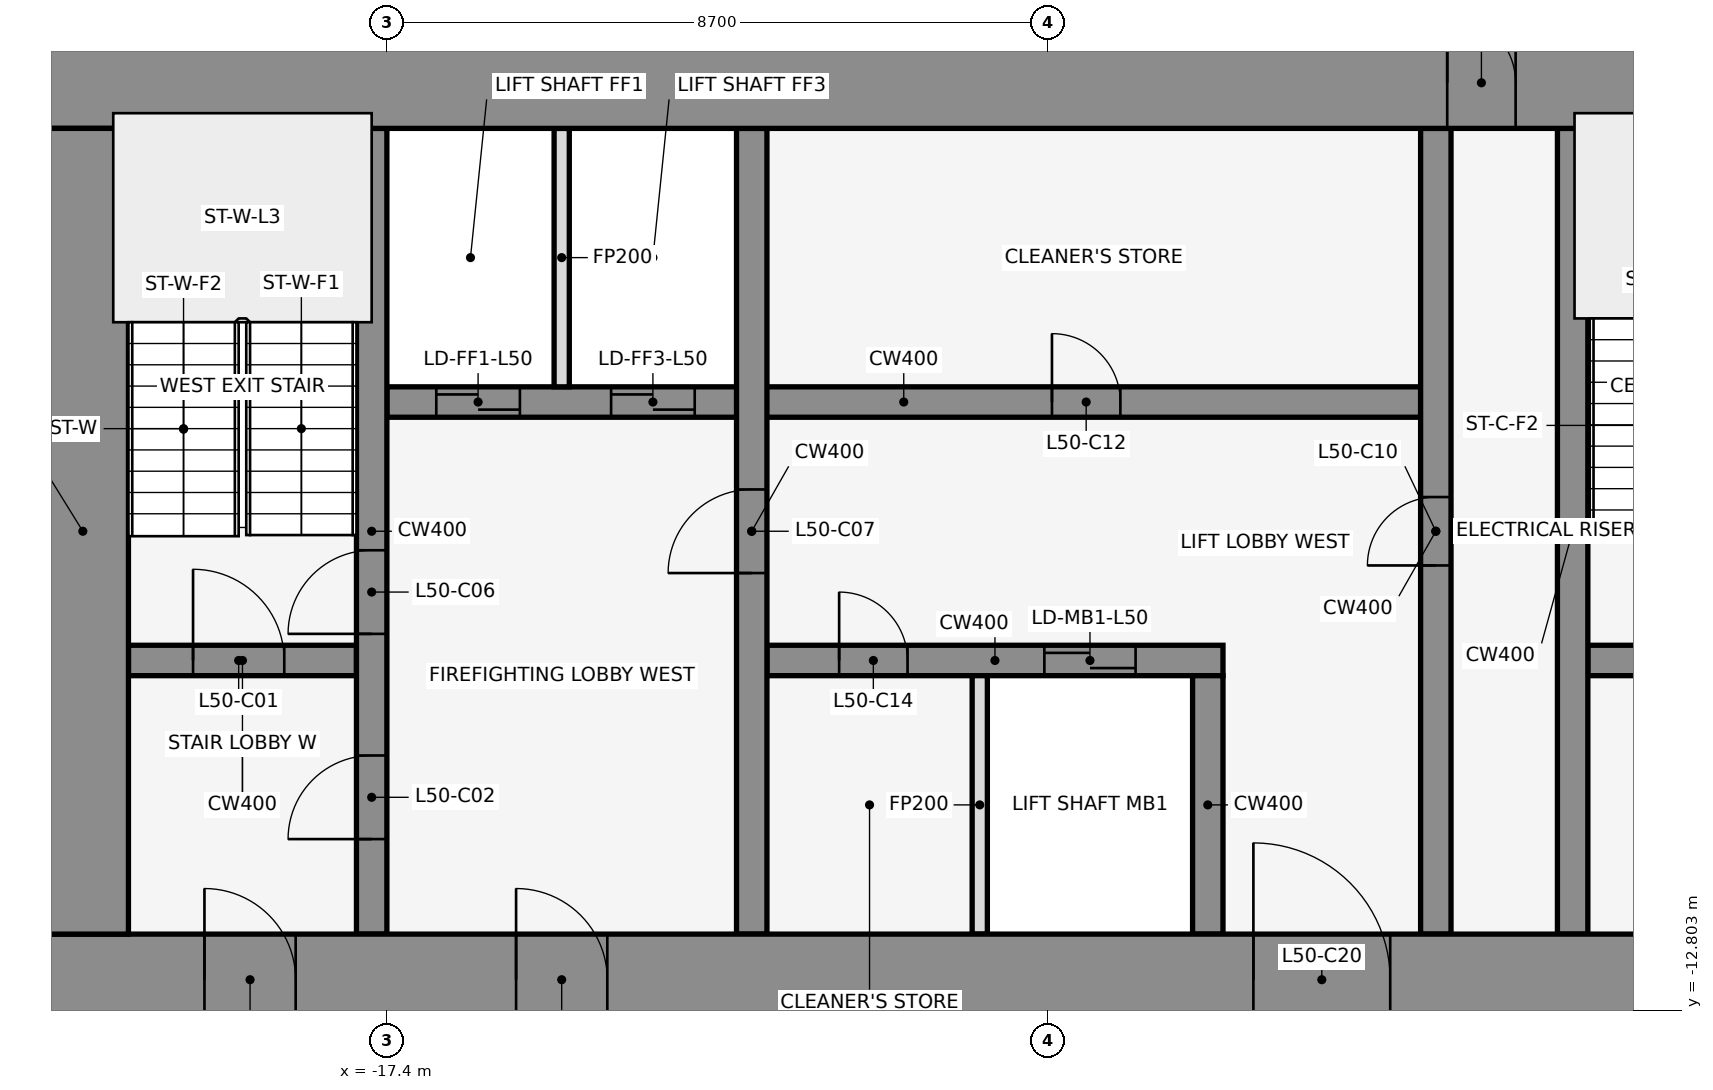
"""IFC4 building model, lengths in metres.
Left out: names, types, materials, properties, quantities, classifications, styles, units other than length and angle.
Written with IfcOpenShell. Run it as: python <this file> out.ifc"""

import sys

from ifc_helpers import new_model, si_unit, direction, frame, frame_2d, origin, place, context, subcontext, project, spatial, rectangle, extrude, element, fill, save


model = new_model("IFC4")
c1 = context("Model", 3, precision=1e-05, world=origin(), true_north=direction((0.0, 1.0)))
c2 = subcontext(c1, "Body", "Model", "MODEL_VIEW")
j1 = project(units=[si_unit("LENGTHUNIT", "METRE"), si_unit("PLANEANGLEUNIT", "RADIAN")], contexts=[c1])
p1 = place(None, origin())
s1 = spatial("IfcSite", under=j1, at=p1, CompositionType="ELEMENT")
p2 = place(p1, origin())
s2 = spatial("IfcBuilding", under=s1, at=p2, CompositionType="ELEMENT")
p3 = place(p2, frame((0.0, 0.0, 223.7)))
s3 = spatial("IfcBuildingStorey", under=s2, at=p3, CompositionType="ELEMENT", Elevation=223.7)
for number, where, z_axis, x_axis in (
    (1, (-0.068, -0.105, 0.0), (0.0, 0.0, 1.0), (-0.84, 0.543, 0.0)),
    (2, (-14.599, 1.08, 0.0), (0.0, 0.0, 1.0), (-0.84, -0.543, 0.0)),
):
    element("IfcWall", number, at=place(p3, frame(where, z_axis=z_axis, x_axis=x_axis)), inside=s3, PredefinedType="STANDARD", context=c2, shape_type="SweptSolid", body=[
        extrude(rectangle(XDim=2.183, YDim=0.25, at=frame_2d((1.091, 0.0))), origin(), (0.0, 0.0, 1.0), 3.95),
    ])
p4 = place(p3, frame((-20.8, -8.2, 0.0), z_axis=(0.0, 0.0, 1.0), x_axis=(1.0, 0.0, 0.0)))
e3 = element("IfcWall", 3, at=p4, inside=s3, PredefinedType="SHEAR", context=c2, shape_type="SweptSolid", body=[
    extrude(rectangle(XDim=3.0, YDim=0.4, at=frame_2d((1.5, 0.0))), origin(), (0.0, 0.0, 1.0), 4.1),
])
p5 = place(p4, frame((0.85, 0.0, 0.0)))
e4 = element("IfcOpeningElement", 4, at=p5, cuts=e3, PredefinedType="OPENING", context=c2, shape_type="SweptSolid", body=[
    extrude(rectangle(XDim=1.2, YDim=2.1, at=frame_2d((0.6, 1.05))), frame((0.0, 0.212, 0.0), z_axis=(0.0, -1.0, 0.0), x_axis=(1.0, 0.0, 0.0)), (0.0, 0.0, 1.0), 0.424),
])
p6 = place(p3, frame((-12.4, -8.2, 0.0), z_axis=(0.0, 0.0, 1.0), x_axis=(1.0, 0.0, 0.0)))
e5 = element("IfcWall", 5, at=p6, inside=s3, PredefinedType="SHEAR", context=c2, shape_type="SweptSolid", body=[
    extrude(rectangle(XDim=6.0, YDim=0.4, at=frame_2d((3.0, 0.0))), origin(), (0.0, 0.0, 1.0), 4.1),
])
p7 = place(p6, frame((3.65, 0.0, 0.0)))
e6 = element("IfcOpeningElement", 6, at=p7, cuts=e5, PredefinedType="OPENING", context=c2, shape_type="SweptSolid", body=[
    extrude(rectangle(XDim=1.2, YDim=2.1, at=frame_2d((0.6, 1.05))), frame((0.0, 0.212, 0.0), z_axis=(0.0, -1.0, 0.0), x_axis=(1.0, 0.0, 0.0)), (0.0, 0.0, 1.0), 0.424),
])
p8 = place(p6, frame((0.95, 0.0, 0.0)))
e7 = element("IfcOpeningElement", 7, at=p8, cuts=e5, PredefinedType="OPENING", context=c2, shape_type="SweptSolid", body=[
    extrude(rectangle(XDim=0.9, YDim=2.1, at=frame_2d((0.45, 1.05))), frame((0.0, 0.212, 0.0), z_axis=(0.0, -1.0, 0.0), x_axis=(1.0, 0.0, 0.0)), (0.0, 0.0, 1.0), 0.424),
])
p9 = place(p3, frame((-1.6, -8.2, 0.0), z_axis=(0.0, 0.0, 1.0), x_axis=(1.0, 0.0, 0.0)))
e8 = element("IfcWall", 8, at=p9, inside=s3, PredefinedType="SHEAR", context=c2, shape_type="SweptSolid", body=[
    extrude(rectangle(XDim=3.2, YDim=0.4, at=frame_2d((1.6, 0.0))), origin(), (0.0, 0.0, 1.0), 4.1),
])
p10 = place(p9, frame((1.05, 0.0, 0.0)))
e9 = element("IfcOpeningElement", 9, at=p10, cuts=e8, PredefinedType="OPENING", context=c2, shape_type="SweptSolid", body=[
    extrude(rectangle(XDim=1.2, YDim=2.1, at=frame_2d((0.6, 1.05))), frame((0.0, 0.212, 0.0), z_axis=(0.0, -1.0, 0.0), x_axis=(1.0, 0.0, 0.0)), (0.0, 0.0, 1.0), 0.424),
])
p11 = place(p3, frame((-17.4, -4.8, 0.0), z_axis=(0.0, 0.0, 1.0), x_axis=(1.0, 0.0, 0.0)))
e10 = element("IfcWall", 10, at=p11, inside=s3, PredefinedType="SHEAR", context=c2, shape_type="SweptSolid", body=[
    extrude(rectangle(XDim=13.6, YDim=0.4, at=frame_2d((6.8, 0.0))), origin(), (0.0, 0.0, 1.0), 4.1),
])
p12 = place(p11, frame((0.65, 0.0, 0.0)))
e11 = element("IfcOpeningElement", 11, at=p12, cuts=e10, PredefinedType="OPENING", context=c2, shape_type="SweptSolid", body=[
    extrude(rectangle(XDim=1.1, YDim=2.1, at=frame_2d((0.55, 1.05))), frame((0.0, 0.212, 0.0), z_axis=(0.0, -1.0, 0.0), x_axis=(1.0, 0.0, 0.0)), (0.0, 0.0, 1.0), 0.424),
])
p13 = place(p11, frame((2.95, 0.0, 0.0)))
e12 = element("IfcOpeningElement", 12, at=p13, cuts=e10, PredefinedType="OPENING", context=c2, shape_type="SweptSolid", body=[
    extrude(rectangle(XDim=1.1, YDim=2.1, at=frame_2d((0.55, 1.05))), frame((0.0, 0.212, 0.0), z_axis=(0.0, -1.0, 0.0), x_axis=(1.0, 0.0, 0.0)), (0.0, 0.0, 1.0), 0.424),
])
p14 = place(p11, frame((8.75, 0.0, 0.0)))
e13 = element("IfcOpeningElement", 13, at=p14, cuts=e10, PredefinedType="OPENING", context=c2, shape_type="SweptSolid", body=[
    extrude(rectangle(XDim=0.9, YDim=2.1, at=frame_2d((0.45, 1.05))), frame((0.0, 0.212, 0.0), z_axis=(0.0, -1.0, 0.0), x_axis=(1.0, 0.0, 0.0)), (0.0, 0.0, 1.0), 0.424),
])
p15 = place(p3, frame((-17.6, -11.8, 0.0), z_axis=(0.0, 0.0, 1.0), x_axis=(0.0, 1.0, 0.0)))
e14 = element("IfcWall", 14, at=p15, inside=s3, PredefinedType="SHEAR", context=c2, shape_type="SweptSolid", body=[
    extrude(rectangle(XDim=10.6, YDim=0.4, at=frame_2d((5.3, 0.0))), origin(), (0.0, 0.0, 1.0), 4.1),
])
p16 = place(p15, frame((1.25, 0.0, 0.0)))
e15 = element("IfcOpeningElement", 15, at=p16, cuts=e14, PredefinedType="OPENING", context=c2, shape_type="SweptSolid", body=[
    extrude(rectangle(XDim=1.1, YDim=2.1, at=frame_2d((0.55, 1.05))), frame((0.0, 0.212, 0.0), z_axis=(0.0, -1.0, 0.0), x_axis=(1.0, 0.0, 0.0)), (0.0, 0.0, 1.0), 0.424),
])
p17 = place(p15, frame((3.95, 0.0, 0.0)))
e16 = element("IfcOpeningElement", 16, at=p17, cuts=e14, PredefinedType="OPENING", context=c2, shape_type="SweptSolid", body=[
    extrude(rectangle(XDim=1.1, YDim=2.1, at=frame_2d((0.55, 1.05))), frame((0.0, 0.212, 0.0), z_axis=(0.0, -1.0, 0.0), x_axis=(1.0, 0.0, 0.0)), (0.0, 0.0, 1.0), 0.424),
])
p18 = place(p3, frame((-15.1, -4.6, 0.0), z_axis=(0.0, 0.0, 1.0), x_axis=(0.0, 1.0, 0.0)))
e17 = element("IfcWall", 17, at=p18, inside=s3, PredefinedType="PARTITIONING", context=c2, shape_type="SweptSolid", body=[
    extrude(rectangle(XDim=3.4, YDim=0.2, at=frame_2d((1.7, 0.0))), origin(), (0.0, 0.0, 1.0), 2.84),
])
p19 = place(p3, frame((-12.6, -11.8, 0.0), z_axis=(0.0, 0.0, 1.0), x_axis=(0.0, 1.0, 0.0)))
e18 = element("IfcWall", 18, at=p19, inside=s3, PredefinedType="SHEAR", context=c2, shape_type="SweptSolid", body=[
    extrude(rectangle(XDim=10.6, YDim=0.4, at=frame_2d((5.3, 0.0))), origin(), (0.0, 0.0, 1.0), 4.1),
])
p20 = place(p19, frame((4.75, 0.0, 0.0)))
e19 = element("IfcOpeningElement", 19, at=p20, cuts=e18, PredefinedType="OPENING", context=c2, shape_type="SweptSolid", body=[
    extrude(rectangle(XDim=1.1, YDim=2.1, at=frame_2d((0.55, 1.05))), frame((0.0, 0.212, 0.0), z_axis=(0.0, -1.0, 0.0), x_axis=(1.0, 0.0, 0.0)), (0.0, 0.0, 1.0), 0.424),
])
p21 = place(p3, frame((-9.6, -11.8, 0.0), z_axis=(0.0, 0.0, 1.0), x_axis=(0.0, 1.0, 0.0)))
e20 = element("IfcWall", 20, at=p21, inside=s3, PredefinedType="PARTITIONING", context=c2, shape_type="SweptSolid", body=[
    extrude(rectangle(XDim=3.4, YDim=0.2, at=frame_2d((1.7, 0.0))), origin(), (0.0, 0.0, 1.0), 2.84),
])
p22 = place(p3, frame((-6.6, -11.8, 0.0), z_axis=(0.0, 0.0, 1.0), x_axis=(0.0, 1.0, 0.0)))
e21 = element("IfcWall", 21, at=p22, inside=s3, PredefinedType="SHEAR", context=c2, shape_type="SweptSolid", body=[
    extrude(rectangle(XDim=3.4, YDim=0.4, at=frame_2d((1.7, 0.0))), origin(), (0.0, 0.0, 1.0), 4.1),
])
p23 = place(p3, frame((-3.6, -11.8, 0.0), z_axis=(0.0, 0.0, 1.0), x_axis=(0.0, 1.0, 0.0)))
e22 = element("IfcWall", 22, at=p23, inside=s3, PredefinedType="SHEAR", context=c2, shape_type="SweptSolid", body=[
    extrude(rectangle(XDim=10.6, YDim=0.4, at=frame_2d((5.3, 0.0))), origin(), (0.0, 0.0, 1.0), 4.1),
])
p24 = place(p23, frame((4.85, 0.0, 0.0)))
e23 = element("IfcOpeningElement", 23, at=p24, cuts=e22, PredefinedType="OPENING", context=c2, shape_type="SweptSolid", body=[
    extrude(rectangle(XDim=0.9, YDim=2.1, at=frame_2d((0.45, 1.05))), frame((0.0, 0.212, 0.0), z_axis=(0.0, -1.0, 0.0), x_axis=(1.0, 0.0, 0.0)), (0.0, 0.0, 1.0), 0.424),
])
p25 = place(p3, frame((-1.8, -11.8, 0.0), z_axis=(0.0, 0.0, 1.0), x_axis=(0.0, 1.0, 0.0)))
e24 = element("IfcWall", 24, at=p25, inside=s3, PredefinedType="SHEAR", context=c2, shape_type="SweptSolid", body=[
    extrude(rectangle(XDim=10.6, YDim=0.4, at=frame_2d((5.3, 0.0))), origin(), (0.0, 0.0, 1.0), 4.1),
])
p26 = place(p3, frame((-22.0, -0.6, 0.0), z_axis=(0.0, 0.0, 1.0), x_axis=(1.0, 0.0, 0.0)))
e25 = element("IfcWall", 25, at=p26, inside=s3, PredefinedType="SHEAR", context=c2, shape_type="SweptSolid", body=[
    extrude(rectangle(XDim=44.0, YDim=1.2, at=frame_2d((22.0, 0.0))), origin(), (0.0, 0.0, 1.0), 4.1),
])
p27 = place(p26, frame((18.55, 0.0, 0.0)))
e26 = element("IfcOpeningElement", 26, at=p27, cuts=e25, PredefinedType="OPENING", context=c2, shape_type="SweptSolid", body=[
    extrude(rectangle(XDim=0.9, YDim=2.1, at=frame_2d((0.45, 1.05))), frame((0.0, 0.612, 0.0), z_axis=(0.0, -1.0, 0.0), x_axis=(1.0, 0.0, 0.0)), (0.0, 0.0, 1.0), 1.224),
])
p28 = place(p26, frame((24.55, 0.0, 0.0)))
e27 = element("IfcOpeningElement", 27, at=p28, cuts=e25, PredefinedType="OPENING", context=c2, shape_type="SweptSolid", body=[
    extrude(rectangle(XDim=0.9, YDim=2.1, at=frame_2d((0.45, 1.05))), frame((0.0, 0.612, 0.0), z_axis=(0.0, -1.0, 0.0), x_axis=(1.0, 0.0, 0.0)), (0.0, 0.0, 1.0), 1.224),
])
p29 = place(p3, frame((-22.0, -12.4, 0.0), z_axis=(0.0, 0.0, 1.0), x_axis=(1.0, 0.0, 0.0)))
e28 = element("IfcWall", 28, at=p29, inside=s3, PredefinedType="SHEAR", context=c2, shape_type="SweptSolid", body=[
    extrude(rectangle(XDim=44.0, YDim=1.2, at=frame_2d((22.0, 0.0))), origin(), (0.0, 0.0, 1.0), 4.1),
])
p30 = place(p29, frame((2.2, 0.0, 0.0)))
e29 = element("IfcOpeningElement", 29, at=p30, cuts=e28, PredefinedType="OPENING", context=c2, shape_type="SweptSolid", body=[
    extrude(rectangle(XDim=1.2, YDim=2.1, at=frame_2d((0.6, 1.05))), frame((0.0, 0.612, 0.0), z_axis=(0.0, -1.0, 0.0), x_axis=(1.0, 0.0, 0.0)), (0.0, 0.0, 1.0), 1.224),
])
p31 = place(p29, frame((21.4, 0.0, 0.0)))
e30 = element("IfcOpeningElement", 30, at=p31, cuts=e28, PredefinedType="OPENING", context=c2, shape_type="SweptSolid", body=[
    extrude(rectangle(XDim=1.2, YDim=2.1, at=frame_2d((0.6, 1.05))), frame((0.0, 0.612, 0.0), z_axis=(0.0, -1.0, 0.0), x_axis=(1.0, 0.0, 0.0)), (0.0, 0.0, 1.0), 1.224),
])
p32 = place(p29, frame((40.6, 0.0, 0.0)))
e31 = element("IfcOpeningElement", 31, at=p32, cuts=e28, PredefinedType="OPENING", context=c2, shape_type="SweptSolid", body=[
    extrude(rectangle(XDim=1.2, YDim=2.1, at=frame_2d((0.6, 1.05))), frame((0.0, 0.612, 0.0), z_axis=(0.0, -1.0, 0.0), x_axis=(1.0, 0.0, 0.0)), (0.0, 0.0, 1.0), 1.224),
])
p33 = place(p29, frame((16.0, 0.0, 0.0)))
e32 = element("IfcOpeningElement", 32, at=p33, cuts=e28, PredefinedType="OPENING", context=c2, shape_type="SweptSolid", body=[
    extrude(rectangle(XDim=1.8, YDim=2.1, at=frame_2d((0.9, 1.05))), frame((0.0, 0.612, 0.0), z_axis=(0.0, -1.0, 0.0), x_axis=(1.0, 0.0, 0.0)), (0.0, 0.0, 1.0), 1.224),
])
p34 = place(p29, frame((6.3, 0.0, 0.0)))
e33 = element("IfcOpeningElement", 33, at=p34, cuts=e28, PredefinedType="OPENING", context=c2, shape_type="SweptSolid", body=[
    extrude(rectangle(XDim=1.2, YDim=2.1, at=frame_2d((0.6, 1.05))), frame((0.0, 0.612, 0.0), z_axis=(0.0, -1.0, 0.0), x_axis=(1.0, 0.0, 0.0)), (0.0, 0.0, 1.0), 1.224),
])
p35 = place(p29, frame((26.2, 0.0, 0.0)))
e34 = element("IfcOpeningElement", 34, at=p35, cuts=e28, PredefinedType="OPENING", context=c2, shape_type="SweptSolid", body=[
    extrude(rectangle(XDim=1.8, YDim=2.1, at=frame_2d((0.9, 1.05))), frame((0.0, 0.612, 0.0), z_axis=(0.0, -1.0, 0.0), x_axis=(1.0, 0.0, 0.0)), (0.0, 0.0, 1.0), 1.224),
])
p36 = place(p29, frame((36.5, 0.0, 0.0)))
e35 = element("IfcOpeningElement", 35, at=p36, cuts=e28, PredefinedType="OPENING", context=c2, shape_type="SweptSolid", body=[
    extrude(rectangle(XDim=1.2, YDim=2.1, at=frame_2d((0.6, 1.05))), frame((0.0, 0.612, 0.0), z_axis=(0.0, -1.0, 0.0), x_axis=(1.0, 0.0, 0.0)), (0.0, 0.0, 1.0), 1.224),
])
p37 = place(p3, frame((-21.4, -11.8, 0.0), z_axis=(0.0, 0.0, 1.0), x_axis=(0.0, 1.0, 0.0)))
e36 = element("IfcWall", 36, at=p37, inside=s3, PredefinedType="SHEAR", context=c2, shape_type="SweptSolid", body=[
    extrude(rectangle(XDim=10.6, YDim=1.2, at=frame_2d((5.3, 0.0))), origin(), (0.0, 0.0, 1.0), 4.1),
])
p38 = place(p5, origin())
e37 = element("IfcDoor", 37, at=p38, inside=s3, OperationType="SINGLE_SWING_LEFT", PredefinedType="DOOR", context=c2, shape_type="SweptSolid", body=[
    extrude(rectangle(XDim=1.2, YDim=2.1, at=frame_2d((0.6, 1.05))), frame((0.0, 0.025, 0.0), z_axis=(0.0, -1.0, 0.0), x_axis=(1.0, 0.0, 0.0)), (0.0, 0.0, 1.0), 0.05),
])
fill(e4, e37)
p39 = place(p16, frame((1.1, 0.0, 0.0), z_axis=(0.0, 0.0, 1.0), x_axis=(-1.0, 0.0, 0.0)))
e38 = element("IfcDoor", 38, at=p39, inside=s3, OperationType="SINGLE_SWING_LEFT", PredefinedType="DOOR", context=c2, shape_type="SweptSolid", body=[
    extrude(rectangle(XDim=1.1, YDim=2.1, at=frame_2d((0.55, 1.05))), frame((0.0, 0.025, 0.0), z_axis=(0.0, -1.0, 0.0), x_axis=(1.0, 0.0, 0.0)), (0.0, 0.0, 1.0), 0.05),
])
fill(e15, e38)
p40 = place(p12, origin())
e39 = element("IfcDoor", 39, at=p40, inside=s3, OperationType="DOUBLE_DOOR_SLIDING", PredefinedType="DOOR", context=c2, shape_type="SweptSolid", body=[
    extrude(rectangle(XDim=1.1, YDim=2.1, at=frame_2d((0.55, 1.05))), frame((0.0, 0.025, 0.0), z_axis=(0.0, -1.0, 0.0), x_axis=(1.0, 0.0, 0.0)), (0.0, 0.0, 1.0), 0.05),
])
fill(e11, e39)
p41 = place(p13, origin())
e40 = element("IfcDoor", 40, at=p41, inside=s3, OperationType="DOUBLE_DOOR_SLIDING", PredefinedType="DOOR", context=c2, shape_type="SweptSolid", body=[
    extrude(rectangle(XDim=1.1, YDim=2.1, at=frame_2d((0.55, 1.05))), frame((0.0, 0.025, 0.0), z_axis=(0.0, -1.0, 0.0), x_axis=(1.0, 0.0, 0.0)), (0.0, 0.0, 1.0), 0.05),
])
fill(e12, e40)
p42 = place(p7, origin())
e41 = element("IfcDoor", 41, at=p42, inside=s3, OperationType="DOUBLE_DOOR_SLIDING", PredefinedType="DOOR", context=c2, shape_type="SweptSolid", body=[
    extrude(rectangle(XDim=1.2, YDim=2.1, at=frame_2d((0.6, 1.05))), frame((0.0, 0.025, 0.0), z_axis=(0.0, -1.0, 0.0), x_axis=(1.0, 0.0, 0.0)), (0.0, 0.0, 1.0), 0.05),
])
fill(e6, e41)
p43 = place(p17, frame((1.1, 0.0, 0.0), z_axis=(0.0, 0.0, 1.0), x_axis=(-1.0, 0.0, 0.0)))
e42 = element("IfcDoor", 42, at=p43, inside=s3, OperationType="SINGLE_SWING_LEFT", PredefinedType="DOOR", context=c2, shape_type="SweptSolid", body=[
    extrude(rectangle(XDim=1.1, YDim=2.1, at=frame_2d((0.55, 1.05))), frame((0.0, 0.025, 0.0), z_axis=(0.0, -1.0, 0.0), x_axis=(1.0, 0.0, 0.0)), (0.0, 0.0, 1.0), 0.05),
])
fill(e16, e42)
p44 = place(p20, origin())
e43 = element("IfcDoor", 43, at=p44, inside=s3, OperationType="SINGLE_SWING_LEFT", PredefinedType="DOOR", context=c2, shape_type="SweptSolid", body=[
    extrude(rectangle(XDim=1.1, YDim=2.1, at=frame_2d((0.55, 1.05))), frame((0.0, 0.025, 0.0), z_axis=(0.0, -1.0, 0.0), x_axis=(1.0, 0.0, 0.0)), (0.0, 0.0, 1.0), 0.05),
])
fill(e19, e43)
p45 = place(p24, frame((0.9, 0.0, 0.0), z_axis=(0.0, 0.0, 1.0), x_axis=(-1.0, 0.0, 0.0)))
e44 = element("IfcDoor", 44, at=p45, inside=s3, OperationType="SINGLE_SWING_LEFT", PredefinedType="DOOR", context=c2, shape_type="SweptSolid", body=[
    extrude(rectangle(XDim=0.9, YDim=2.1, at=frame_2d((0.45, 1.05))), frame((0.0, 0.025, 0.0), z_axis=(0.0, -1.0, 0.0), x_axis=(1.0, 0.0, 0.0)), (0.0, 0.0, 1.0), 0.05),
])
fill(e23, e44)
p46 = place(p14, origin())
e45 = element("IfcDoor", 45, at=p46, inside=s3, OperationType="SINGLE_SWING_RIGHT", PredefinedType="DOOR", context=c2, shape_type="SweptSolid", body=[
    extrude(rectangle(XDim=0.9, YDim=2.1, at=frame_2d((0.45, 1.05))), frame((0.0, 0.025, 0.0), z_axis=(0.0, -1.0, 0.0), x_axis=(1.0, 0.0, 0.0)), (0.0, 0.0, 1.0), 0.05),
])
fill(e13, e45)
p47 = place(p8, frame((0.9, 0.0, 0.0), z_axis=(0.0, 0.0, 1.0), x_axis=(-1.0, 0.0, 0.0)))
e46 = element("IfcDoor", 46, at=p47, inside=s3, OperationType="SINGLE_SWING_LEFT", PredefinedType="DOOR", context=c2, shape_type="SweptSolid", body=[
    extrude(rectangle(XDim=0.9, YDim=2.1, at=frame_2d((0.45, 1.05))), frame((0.0, 0.025, 0.0), z_axis=(0.0, -1.0, 0.0), x_axis=(1.0, 0.0, 0.0)), (0.0, 0.0, 1.0), 0.05),
])
fill(e7, e46)
p48 = place(p27, origin())
e47 = element("IfcDoor", 47, at=p48, inside=s3, OperationType="SINGLE_SWING_LEFT", PredefinedType="DOOR", context=c2, shape_type="SweptSolid", body=[
    extrude(rectangle(XDim=0.9, YDim=2.1, at=frame_2d((0.45, 1.05))), frame((0.0, 0.025, 0.0), z_axis=(0.0, -1.0, 0.0), x_axis=(1.0, 0.0, 0.0)), (0.0, 0.0, 1.0), 0.05),
])
fill(e26, e47)
p49 = place(p30, frame((1.2, 0.0, 0.0), z_axis=(0.0, 0.0, 1.0), x_axis=(-1.0, 0.0, 0.0)))
e48 = element("IfcDoor", 48, at=p49, inside=s3, OperationType="SINGLE_SWING_RIGHT", PredefinedType="DOOR", context=c2, shape_type="SweptSolid", body=[
    extrude(rectangle(XDim=1.2, YDim=2.1, at=frame_2d((0.6, 1.05))), frame((0.0, 0.025, 0.0), z_axis=(0.0, -1.0, 0.0), x_axis=(1.0, 0.0, 0.0)), (0.0, 0.0, 1.0), 0.05),
])
fill(e29, e48)
p50 = place(p33, origin())
e49 = element("IfcDoor", 49, at=p50, inside=s3, OperationType="SINGLE_SWING_LEFT", PredefinedType="DOOR", context=c2, shape_type="SweptSolid", body=[
    extrude(rectangle(XDim=1.8, YDim=2.1, at=frame_2d((0.9, 1.05))), frame((0.0, 0.025, 0.0), z_axis=(0.0, -1.0, 0.0), x_axis=(1.0, 0.0, 0.0)), (0.0, 0.0, 1.0), 0.05),
])
fill(e32, e49)
p51 = place(p34, frame((1.2, 0.0, 0.0), z_axis=(0.0, 0.0, 1.0), x_axis=(-1.0, 0.0, 0.0)))
e50 = element("IfcDoor", 50, at=p51, inside=s3, OperationType="SINGLE_SWING_RIGHT", PredefinedType="DOOR", context=c2, shape_type="SweptSolid", body=[
    extrude(rectangle(XDim=1.2, YDim=2.1, at=frame_2d((0.6, 1.05))), frame((0.0, 0.025, 0.0), z_axis=(0.0, -1.0, 0.0), x_axis=(1.0, 0.0, 0.0)), (0.0, 0.0, 1.0), 0.05),
])
fill(e33, e50)
save(model, sys.argv[1])
